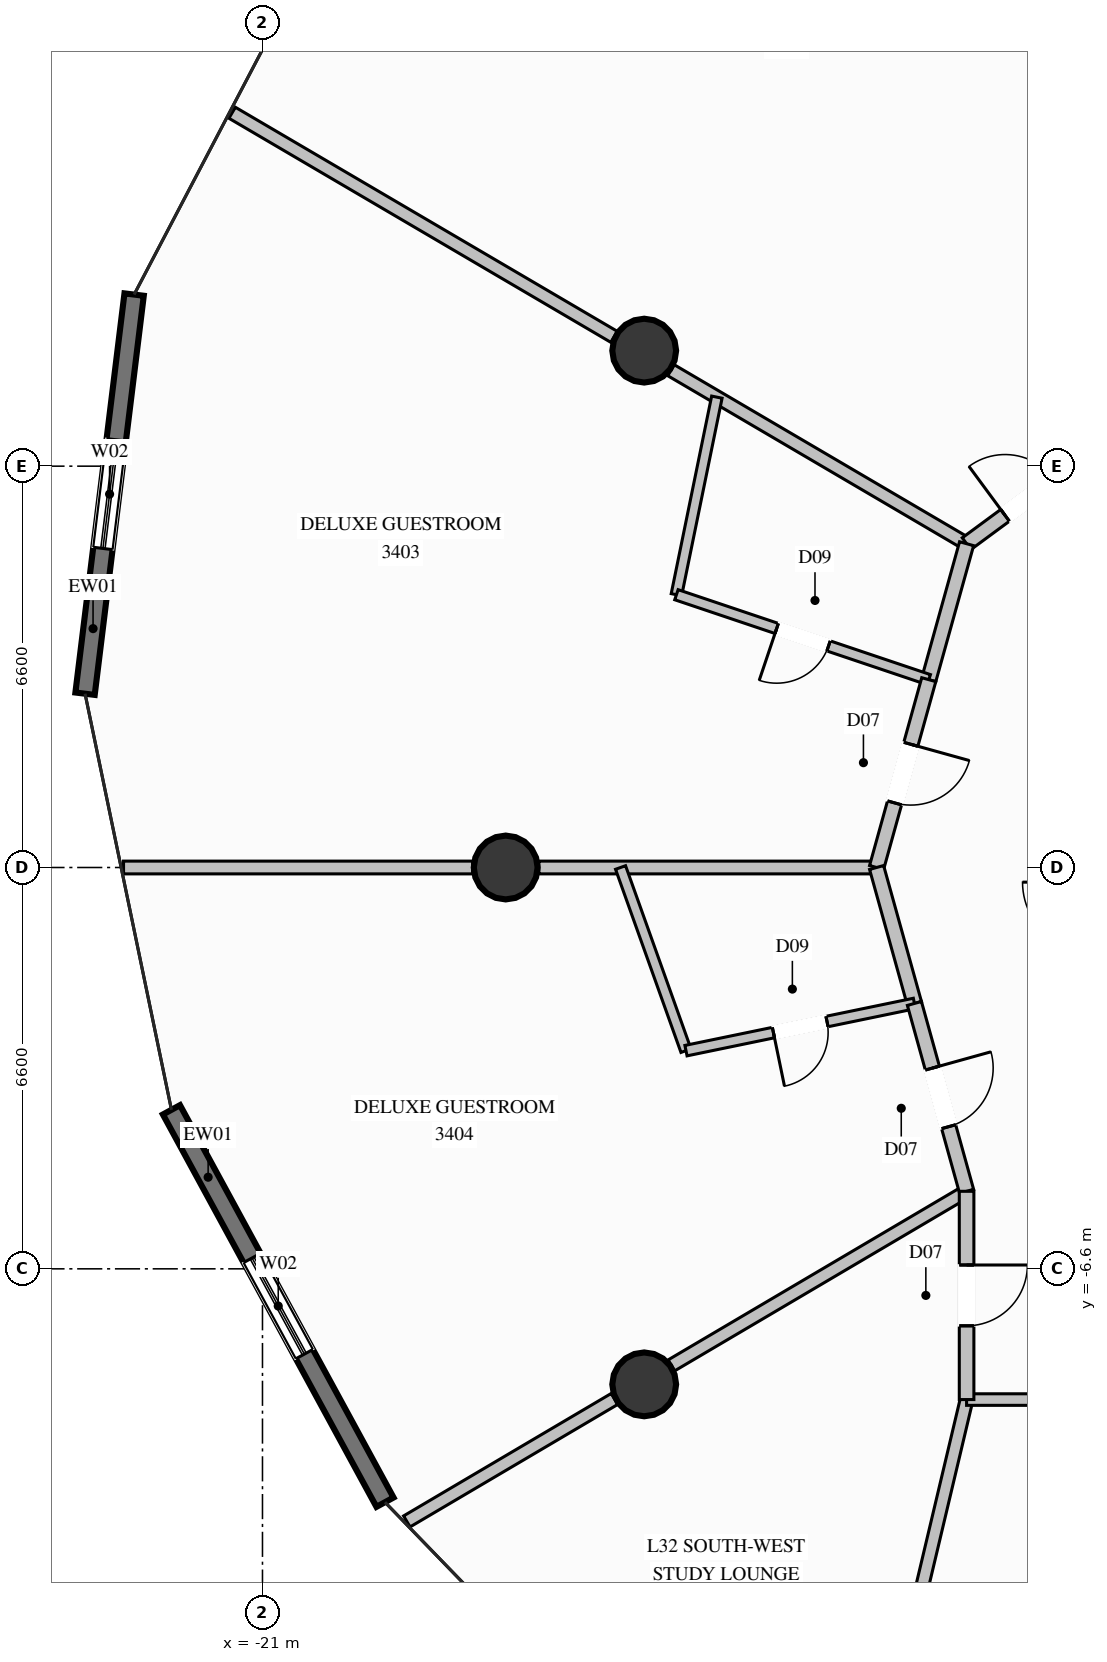
"""IFC4 building model, lengths in metres.
Left out: names, types, materials, properties, quantities, classifications, styles, units other than length and angle.
Written with IfcOpenShell. Run it as: python <this file> out.ifc"""

import sys

from ifc_helpers import new_model, si_unit, direction, frame, frame_2d, origin, origin_2d, place, context, subcontext, project, spatial, rectangle, circle, extrude, element, fill, save


model = new_model("IFC4")
c1 = context("Model", 3, precision=1e-05, world=origin(), true_north=direction((0.0, 1.0)))
c2 = subcontext(c1, "Body", "Model", "MODEL_VIEW")
j1 = project(units=[si_unit("LENGTHUNIT", "METRE"), si_unit("PLANEANGLEUNIT", "RADIAN")], contexts=[c1])
p1 = place(None, origin())
s1 = spatial("IfcSite", under=j1, at=p1, CompositionType="ELEMENT")
p2 = place(p1, origin())
s2 = spatial("IfcBuilding", under=s1, at=p2, CompositionType="ELEMENT")
p3 = place(p2, frame((0.0, 0.0, 127.8)))
s3 = spatial("IfcBuildingStorey", under=s2, at=p3, CompositionType="ELEMENT", Elevation=127.8)
for number, where, z_axis, x_axis in (
    (1, (-14.722, 8.5, 0.0), (0.0, 0.0, 1.0), (1.0, 0.0, 0.0)),
    (2, (-17.0, 0.0, 0.0), (0.0, 0.0, 1.0), (1.0, 0.0, 0.0)),
    (3, (-14.722, -8.5, 0.0), (0.0, 0.0, 1.0), (1.0, 0.0, 0.0)),
):
    element("IfcColumn", number, at=place(p3, frame(where, z_axis=z_axis, x_axis=x_axis)), inside=s3, PredefinedType="COLUMN", context=c2, shape_type="SweptSolid", body=[
        extrude(circle(Radius=0.525, at=origin_2d()), origin(), (0.0, 0.0, 1.0), 3.6),
    ])
p4 = place(p3, frame((-23.918, 2.858, 0.0), z_axis=(0.0, 0.0, 1.0), x_axis=(0.122003589953, 0.992529659022, 0.0)))
e4 = element("IfcWall", 4, at=p4, inside=s3, PredefinedType="SOLIDWALL", context=c2, shape_type="SweptSolid", body=[
    extrude(rectangle(XDim=6.614, YDim=0.32, at=frame_2d((3.307, 0.0))), origin(), (0.0, 0.0, 1.0), 3.35),
])
p5 = place(p4, frame((2.407, 0.0, 0.35)))
e5 = element("IfcOpeningElement", 5, at=p5, cuts=e4, PredefinedType="OPENING", context=c2, shape_type="SweptSolid", body=[
    extrude(rectangle(XDim=1.8, YDim=2.6, at=frame_2d((0.9, 1.3))), frame((0.0, 0.17, 0.0), z_axis=(0.0, -1.0, 0.0), x_axis=(1.0, 0.0, 0.0)), (0.0, 0.0, 1.0), 0.34),
])
p6 = place(p3, frame((-18.985, -10.438, 0.0), z_axis=(0.0, 0.0, 1.0), x_axis=(-0.478034683055, 0.878340959876, 0.0)))
e6 = element("IfcWall", 6, at=p6, inside=s3, PredefinedType="SOLIDWALL", context=c2, shape_type="SweptSolid", body=[
    extrude(rectangle(XDim=7.347, YDim=0.32, at=frame_2d((3.673, 0.0))), origin(), (0.0, 0.0, 1.0), 3.35),
])
p7 = place(p6, frame((2.773, 0.0, 0.35)))
e7 = element("IfcOpeningElement", 7, at=p7, cuts=e6, PredefinedType="OPENING", context=c2, shape_type="SweptSolid", body=[
    extrude(rectangle(XDim=1.8, YDim=2.6, at=frame_2d((0.9, 1.3))), frame((0.0, 0.17, 0.0), z_axis=(0.0, -1.0, 0.0), x_axis=(1.0, 0.0, 0.0)), (0.0, 0.0, 1.0), 0.34),
])
p8 = place(p3, frame((-9.42, 5.325, 0.0), z_axis=(0.0, 0.0, 1.0), x_axis=(-0.862477017481, 0.506096230293, 0.0)))
e8 = element("IfcWall", 8, at=p8, inside=s3, PredefinedType="PARTITIONING", context=c2, shape_type="SweptSolid", body=[
    extrude(rectangle(XDim=5.637, YDim=0.21, at=frame_2d((2.819, 0.0))), origin(), (0.0, 0.0, 1.0), 2.717),
])
p9 = place(p3, frame((-15.218, 8.727, 0.0), z_axis=(0.0, 0.0, 1.0), x_axis=(-0.862512809527, 0.506035229409, 0.0)))
e9 = element("IfcWall", 9, at=p9, inside=s3, PredefinedType="PARTITIONING", context=c2, shape_type="SweptSolid", body=[
    extrude(rectangle(XDim=7.282, YDim=0.21, at=frame_2d((3.641, 0.0))), origin(), (0.0, 0.0, 1.0), 3.35),
])
p10 = place(p3, frame((-10.9, 0.0, 0.0), z_axis=(0.0, 0.0, 1.0), x_axis=(-1.0, 0.0, 0.0)))
e10 = element("IfcWall", 10, at=p10, inside=s3, PredefinedType="PARTITIONING", context=c2, shape_type="SweptSolid", body=[
    extrude(rectangle(XDim=5.555, YDim=0.21, at=frame_2d((2.778, 0.0))), origin(), (0.0, 0.0, 1.0), 3.35),
])
p11 = place(p3, frame((-17.545, 0.0, 0.0), z_axis=(0.0, 0.0, 1.0), x_axis=(-1.0, 0.0, 0.0)))
e11 = element("IfcWall", 11, at=p11, inside=s3, PredefinedType="PARTITIONING", context=c2, shape_type="SweptSolid", body=[
    extrude(rectangle(XDim=5.74, YDim=0.21, at=frame_2d((2.87, 0.0))), origin(), (0.0, 0.0, 1.0), 3.35),
])
p12 = place(p3, frame((-9.42, -5.325, 0.0), z_axis=(0.0, 0.0, 1.0), x_axis=(-0.861378052692, -0.507964418381, 0.0)))
e12 = element("IfcWall", 12, at=p12, inside=s3, PredefinedType="PARTITIONING", context=c2, shape_type="SweptSolid", body=[
    extrude(rectangle(XDim=5.636, YDim=0.21, at=frame_2d((2.818, 0.0))), origin(), (0.0, 0.0, 1.0), 2.717),
])
p13 = place(p3, frame((-15.211, -8.74, 0.0), z_axis=(0.0, 0.0, 1.0), x_axis=(-0.861374884853, -0.507969790188, 0.0)))
e13 = element("IfcWall", 13, at=p13, inside=s3, PredefinedType="PARTITIONING", context=c2, shape_type="SweptSolid", body=[
    extrude(rectangle(XDim=3.965, YDim=0.21, at=frame_2d((1.982, 0.0))), origin(), (0.0, 0.0, 1.0), 3.35),
])
p14 = place(p3, frame((-2.94, 6.85, 0.0), z_axis=(0.0, 0.0, 1.0), x_axis=(-0.412479187099, 0.910967024765, 0.0)))
e14 = element("IfcWall", 14, at=p14, inside=s3, PredefinedType="PARTITIONING", context=c2, shape_type="SweptSolid", body=[
    extrude(rectangle(XDim=15.902, YDim=0.21, at=frame_2d((7.951, 0.0))), origin(), (0.0, 0.0, 1.0), 3.35),
])
p15 = place(p3, frame((-9.42, 5.325, 0.0), z_axis=(0.0, 0.0, 1.0), x_axis=(0.805053450612, 0.593202277185, 0.0)))
e15 = element("IfcWall", 15, at=p15, inside=s3, PredefinedType="PARTITIONING", context=c2, shape_type="SweptSolid", body=[
    extrude(rectangle(XDim=2.571, YDim=0.24, at=frame_2d((1.286, 0.0))), origin(), (0.0, 0.0, 1.0), 3.35),
])
p16 = place(p15, frame((0.786, 0.0, 0.0)))
e16 = element("IfcOpeningElement", 16, at=p16, cuts=e15, PredefinedType="OPENING", context=c2, shape_type="SweptSolid", body=[
    extrude(rectangle(XDim=1.0, YDim=2.2, at=frame_2d((0.5, 1.1))), frame((0.0, 0.13, 0.0), z_axis=(0.0, -1.0, 0.0), x_axis=(1.0, 0.0, 0.0)), (0.0, 0.0, 1.0), 0.26),
])
p17 = place(p3, frame((-9.42, 5.325, 0.0), z_axis=(0.0, 0.0, 1.0), x_axis=(-0.268045342481, -0.963406297662, 0.0)))
e17 = element("IfcWall", 17, at=p17, inside=s3, PredefinedType="PARTITIONING", context=c2, shape_type="SweptSolid", body=[
    extrude(rectangle(XDim=2.321, YDim=0.24, at=frame_2d((1.16, 0.0))), origin(), (0.0, 0.0, 1.0), 3.35),
])
p18 = place(p3, frame((-13.527, 7.735, 0.0), z_axis=(0.0, 0.0, 1.0), x_axis=(-0.200460473107, -0.979701790711, 0.0)))
e18 = element("IfcWall", 18, at=p18, inside=s3, PredefinedType="PLUMBINGWALL", context=c2, shape_type="SweptSolid", body=[
    extrude(rectangle(XDim=3.316, YDim=0.175, at=frame_2d((1.658, 0.0))), origin(), (0.0, 0.0, 1.0), 3.35),
])
p19 = place(p3, frame((-10.042, 3.089, 0.0), z_axis=(0.0, 0.0, 1.0), x_axis=(-0.947742433388, 0.319036486872, 0.0)))
e19 = element("IfcWall", 19, at=p19, inside=s3, PredefinedType="PLUMBINGWALL", context=c2, shape_type="SweptSolid", body=[
    extrude(rectangle(XDim=4.379, YDim=0.175, at=frame_2d((2.189, 0.0))), origin(), (0.0, 0.0, 1.0), 3.35),
])
p20 = place(p19, frame((1.739, 0.0, 0.0)))
e20 = element("IfcOpeningElement", 20, at=p20, cuts=e19, PredefinedType="OPENING", context=c2, shape_type="SweptSolid", body=[
    extrude(rectangle(XDim=0.9, YDim=2.1, at=frame_2d((0.45, 1.05))), frame((0.0, 0.098, 0.0), z_axis=(0.0, -1.0, 0.0), x_axis=(1.0, 0.0, 0.0)), (0.0, 0.0, 1.0), 0.195),
])
p21 = place(p3, frame((-10.042, 3.089, 0.0), z_axis=(0.0, 0.0, 1.0), x_axis=(-0.267592805492, -0.963532091032, 0.0)))
e21 = element("IfcWall", 21, at=p21, inside=s3, PredefinedType="PARTITIONING", context=c2, shape_type="SweptSolid", body=[
    extrude(rectangle(XDim=3.206, YDim=0.24, at=frame_2d((1.603, 0.0))), origin(), (0.0, 0.0, 1.0), 3.35),
])
p22 = place(p21, frame((1.103, 0.0, 0.0)))
e22 = element("IfcOpeningElement", 22, at=p22, cuts=e21, PredefinedType="OPENING", context=c2, shape_type="SweptSolid", body=[
    extrude(rectangle(XDim=1.0, YDim=2.2, at=frame_2d((0.5, 1.1))), frame((0.0, 0.13, 0.0), z_axis=(0.0, -1.0, 0.0), x_axis=(1.0, 0.0, 0.0)), (0.0, 0.0, 1.0), 0.26),
])
p23 = place(p3, frame((-10.9, 0.0, 0.0), z_axis=(0.0, 0.0, 1.0), x_axis=(0.267920543299, -0.963441011416, 0.0)))
e23 = element("IfcWall", 23, at=p23, inside=s3, PredefinedType="PARTITIONING", context=c2, shape_type="SweptSolid", body=[
    extrude(rectangle(XDim=2.321, YDim=0.24, at=frame_2d((1.161, 0.0))), origin(), (0.0, 0.0, 1.0), 3.35),
])
p24 = place(p3, frame((-15.111, 0.0, 0.0), z_axis=(0.0, 0.0, 1.0), x_axis=(0.336466950823, -0.941695275025, 0.0)))
e24 = element("IfcWall", 24, at=p24, inside=s3, PredefinedType="PLUMBINGWALL", context=c2, shape_type="SweptSolid", body=[
    extrude(rectangle(XDim=3.198, YDim=0.175, at=frame_2d((1.599, 0.0))), origin(), (0.0, 0.0, 1.0), 3.35),
])
p25 = place(p3, frame((-10.278, -2.236, 0.0), z_axis=(0.0, 0.0, 1.0), x_axis=(-0.979332635471, -0.202256246135, 0.0)))
e25 = element("IfcWall", 25, at=p25, inside=s3, PredefinedType="PLUMBINGWALL", context=c2, shape_type="SweptSolid", body=[
    extrude(rectangle(XDim=3.836, YDim=0.175, at=frame_2d((1.918, 0.0))), origin(), (0.0, 0.0, 1.0), 3.35),
])
p26 = place(p25, frame((1.468, 0.0, 0.0)))
e26 = element("IfcOpeningElement", 26, at=p26, cuts=e25, PredefinedType="OPENING", context=c2, shape_type="SweptSolid", body=[
    extrude(rectangle(XDim=0.9, YDim=2.1, at=frame_2d((0.45, 1.05))), frame((0.0, 0.098, 0.0), z_axis=(0.0, -1.0, 0.0), x_axis=(1.0, 0.0, 0.0)), (0.0, 0.0, 1.0), 0.195),
])
p27 = place(p3, frame((-10.278, -2.236, 0.0), z_axis=(0.0, 0.0, 1.0), x_axis=(0.267683140967, -0.96350699844, 0.0)))
e27 = element("IfcWall", 27, at=p27, inside=s3, PredefinedType="PARTITIONING", context=c2, shape_type="SweptSolid", body=[
    extrude(rectangle(XDim=3.206, YDim=0.24, at=frame_2d((1.603, 0.0))), origin(), (0.0, 0.0, 1.0), 3.35),
])
p28 = place(p27, frame((1.103, 0.0, 0.0)))
e28 = element("IfcOpeningElement", 28, at=p28, cuts=e27, PredefinedType="OPENING", context=c2, shape_type="SweptSolid", body=[
    extrude(rectangle(XDim=1.0, YDim=2.2, at=frame_2d((0.5, 1.1))), frame((0.0, 0.13, 0.0), z_axis=(0.0, -1.0, 0.0), x_axis=(1.0, 0.0, 0.0)), (0.0, 0.0, 1.0), 0.26),
])
p29 = place(p3, frame((-9.42, -8.75, 0.0), z_axis=(0.0, 0.0, 1.0), x_axis=(-0.231121330831, -0.972924935663, 0.0)))
e29 = element("IfcWall", 29, at=p29, inside=s3, PredefinedType="PARTITIONING", context=c2, shape_type="SweptSolid", body=[
    extrude(rectangle(XDim=8.684, YDim=0.21, at=frame_2d((4.342, 0.0))), origin(), (0.0, 0.0, 1.0), 3.35),
])
p30 = place(p3, frame((-9.42, -8.75, 0.0), z_axis=(0.0, 0.0, 1.0), x_axis=(1.0, 0.0, 0.0)))
e30 = element("IfcWall", 30, at=p30, inside=s3, PredefinedType="PARTITIONING", context=c2, shape_type="SweptSolid", body=[
    extrude(rectangle(XDim=9.42, YDim=0.19, at=frame_2d((4.71, 0.0))), origin(), (0.0, 0.0, 1.0), 3.35),
])
p31 = place(p30, frame((4.235, 0.0, 0.0)))
e31 = element("IfcOpeningElement", 31, at=p31, cuts=e30, PredefinedType="OPENING", context=c2, shape_type="SweptSolid", body=[
    extrude(rectangle(XDim=0.95, YDim=2.1, at=frame_2d((0.475, 1.05))), frame((0.0, 0.105, 0.0), z_axis=(0.0, -1.0, 0.0), x_axis=(1.0, 0.0, 0.0)), (0.0, 0.0, 1.0), 0.21),
])
p32 = place(p3, frame((-9.42, -5.325, 0.0), z_axis=(0.0, 0.0, 1.0), x_axis=(0.0, -1.0, 0.0)))
e32 = element("IfcWall", 32, at=p32, inside=s3, PredefinedType="PARTITIONING", context=c2, shape_type="SweptSolid", body=[
    extrude(rectangle(XDim=3.425, YDim=0.24, at=frame_2d((1.712, 0.0))), origin(), (0.0, 0.0, 1.0), 3.35),
])
p33 = place(p32, frame((1.212, 0.0, 0.0)))
e33 = element("IfcOpeningElement", 33, at=p33, cuts=e32, PredefinedType="OPENING", context=c2, shape_type="SweptSolid", body=[
    extrude(rectangle(XDim=1.0, YDim=2.2, at=frame_2d((0.5, 1.1))), frame((0.0, 0.13, 0.0), z_axis=(0.0, -1.0, 0.0), x_axis=(1.0, 0.0, 0.0)), (0.0, 0.0, 1.0), 0.26),
])
p34 = place(p5, origin())
e34 = element("IfcWindow", 34, at=p34, inside=s3, PartitioningType="SINGLE_PANEL", PredefinedType="WINDOW", context=c2, shape_type="SweptSolid", body=[
    extrude(rectangle(XDim=1.8, YDim=2.6, at=frame_2d((0.9, 1.3))), frame((0.0, 0.03, 0.0), z_axis=(0.0, -1.0, 0.0), x_axis=(1.0, 0.0, 0.0)), (0.0, 0.0, 1.0), 0.06),
])
fill(e5, e34)
p35 = place(p7, origin())
e35 = element("IfcWindow", 35, at=p35, inside=s3, PartitioningType="SINGLE_PANEL", PredefinedType="WINDOW", context=c2, shape_type="SweptSolid", body=[
    extrude(rectangle(XDim=1.8, YDim=2.6, at=frame_2d((0.9, 1.3))), frame((0.0, 0.03, 0.0), z_axis=(0.0, -1.0, 0.0), x_axis=(1.0, 0.0, 0.0)), (0.0, 0.0, 1.0), 0.06),
])
fill(e7, e35)
p36 = place(p16, origin())
e36 = element("IfcDoor", 36, at=p36, inside=s3, OperationType="SINGLE_SWING_LEFT", PredefinedType="DOOR", context=c2, shape_type="SweptSolid", body=[
    extrude(rectangle(XDim=1.0, YDim=2.2, at=frame_2d((0.5, 1.1))), frame((0.0, 0.025, 0.0), z_axis=(0.0, -1.0, 0.0), x_axis=(1.0, 0.0, 0.0)), (0.0, 0.0, 1.0), 0.05),
])
fill(e16, e36)
p37 = place(p20, origin())
e37 = element("IfcDoor", 37, at=p37, inside=s3, OperationType="SINGLE_SWING_RIGHT", PredefinedType="DOOR", context=c2, shape_type="SweptSolid", body=[
    extrude(rectangle(XDim=0.9, YDim=2.1, at=frame_2d((0.45, 1.05))), frame((0.0, 0.025, 0.0), z_axis=(0.0, -1.0, 0.0), x_axis=(1.0, 0.0, 0.0)), (0.0, 0.0, 1.0), 0.05),
])
fill(e20, e37)
p38 = place(p22, origin())
e38 = element("IfcDoor", 38, at=p38, inside=s3, OperationType="SINGLE_SWING_LEFT", PredefinedType="DOOR", context=c2, shape_type="SweptSolid", body=[
    extrude(rectangle(XDim=1.0, YDim=2.2, at=frame_2d((0.5, 1.1))), frame((0.0, 0.025, 0.0), z_axis=(0.0, -1.0, 0.0), x_axis=(1.0, 0.0, 0.0)), (0.0, 0.0, 1.0), 0.05),
])
fill(e22, e38)
p39 = place(p26, origin())
e39 = element("IfcDoor", 39, at=p39, inside=s3, OperationType="SINGLE_SWING_RIGHT", PredefinedType="DOOR", context=c2, shape_type="SweptSolid", body=[
    extrude(rectangle(XDim=0.9, YDim=2.1, at=frame_2d((0.45, 1.05))), frame((0.0, 0.025, 0.0), z_axis=(0.0, -1.0, 0.0), x_axis=(1.0, 0.0, 0.0)), (0.0, 0.0, 1.0), 0.05),
])
fill(e26, e39)
p40 = place(p28, origin())
e40 = element("IfcDoor", 40, at=p40, inside=s3, OperationType="SINGLE_SWING_LEFT", PredefinedType="DOOR", context=c2, shape_type="SweptSolid", body=[
    extrude(rectangle(XDim=1.0, YDim=2.2, at=frame_2d((0.5, 1.1))), frame((0.0, 0.025, 0.0), z_axis=(0.0, -1.0, 0.0), x_axis=(1.0, 0.0, 0.0)), (0.0, 0.0, 1.0), 0.05),
])
fill(e28, e40)
p41 = place(p33, origin())
e41 = element("IfcDoor", 41, at=p41, inside=s3, OperationType="SINGLE_SWING_LEFT", PredefinedType="DOOR", context=c2, shape_type="SweptSolid", body=[
    extrude(rectangle(XDim=1.0, YDim=2.2, at=frame_2d((0.5, 1.1))), frame((0.0, 0.025, 0.0), z_axis=(0.0, -1.0, 0.0), x_axis=(1.0, 0.0, 0.0)), (0.0, 0.0, 1.0), 0.05),
])
fill(e33, e41)
save(model, sys.argv[1])
